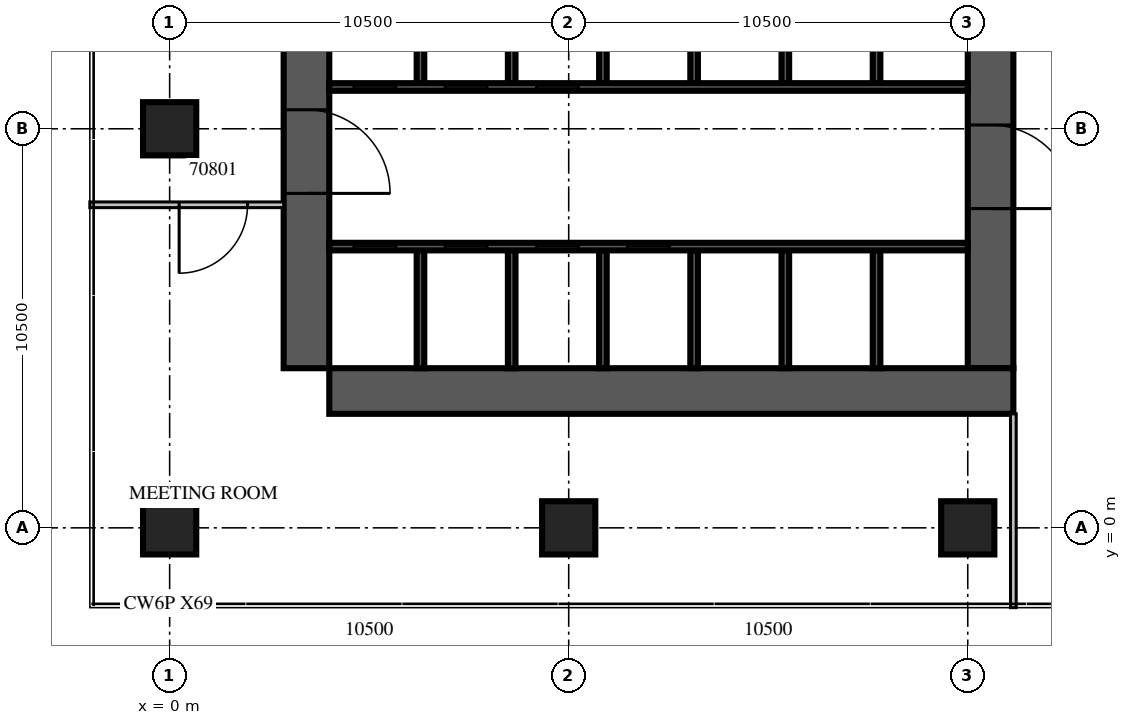
"""IFC4 building model, lengths in metres.
Left out: names, types, materials, properties, quantities, classifications, styles, units other than length and angle.
Written with IfcOpenShell. Run it as: python <this file> out.ifc"""

import sys

from ifc_helpers import new_model, si_unit, direction, frame, frame_2d, origin, origin_2d, place, context, subcontext, project, spatial, rectangle, extrude, source, transform, mapped, element, fill, save


model = new_model("IFC4")
c1 = context("Model", 3, precision=1e-05, world=origin(), true_north=direction((0.0, 1.0)))
c2 = subcontext(c1, "Body", "Model", "MODEL_VIEW")
j1 = project(units=[si_unit("LENGTHUNIT", "METRE"), si_unit("PLANEANGLEUNIT", "RADIAN")], contexts=[c1])
p1 = place(None, origin())
s1 = spatial("IfcSite", under=j1, at=p1, CompositionType="ELEMENT")
p2 = place(p1, origin())
s2 = spatial("IfcBuilding", under=s1, at=p2, CompositionType="ELEMENT")
p3 = place(p2, frame((0.0, 0.0, 29.1)))
s3 = spatial("IfcBuildingStorey", under=s2, at=p3, CompositionType="ELEMENT", Elevation=29.1)
m1 = source(origin(), c2, "Body", "SweptSolid", [
    extrude(rectangle(XDim=1.4, YDim=1.4, at=origin_2d()), origin(), (0.0, 0.0, 1.0), 5.4),
])
for number, where, z_axis, x_axis in (
    (1, (0.0, 0.0, 0.0), (0.0, 0.0, 1.0), (1.0, 0.0, 0.0)),
    (2, (0.0, 10.5, 0.0), (0.0, 0.0, 1.0), (1.0, 0.0, 0.0)),
    (3, (10.5, 0.0, 0.0), (0.0, 0.0, 1.0), (1.0, 0.0, 0.0)),
    (4, (21.0, 0.0, 0.0), (0.0, 0.0, 1.0), (1.0, 0.0, 0.0)),
):
    element("IfcColumn", number, at=place(p3, frame(where, z_axis=z_axis, x_axis=x_axis)), inside=s3, PredefinedType="COLUMN", context=c2, shape_type="MappedRepresentation", body=[
        mapped(m1, transform((0.0, 0.0, 0.0), scale=1.0)),
    ])
m2 = source(origin(), c2, "Body", "SweptSolid", [
    extrude(rectangle(XDim=18.0, YDim=1.2, at=frame_2d((9.0, 0.0))), origin(), (0.0, 0.0, 1.0), 5.4),
])
p4 = place(p3, frame((3.6, 4.2, 0.0), z_axis=(0.0, 0.0, 1.0), x_axis=(0.0, 1.0, 0.0)))
e5 = element("IfcWall", 5, at=p4, inside=s3, PredefinedType="SHEAR", context=c2, shape_type="MappedRepresentation", body=[
    mapped(m2, transform((0.0, 0.0, 0.0), scale=1.0)),
])
m3 = source(origin(), c2, "Body", "SweptSolid", [
    extrude(rectangle(XDim=2.2, YDim=2.1, at=frame_2d((1.1, 1.05))), frame((0.0, 0.61, 0.0), z_axis=(0.0, -1.0, 0.0), x_axis=(1.0, 0.0, 0.0)), (0.0, 0.0, 1.0), 1.22),
])
p5 = place(p4, frame((4.6, 0.0, 0.0)))
e6 = element("IfcOpeningElement", 6, at=p5, cuts=e5, PredefinedType="OPENING", context=c2, shape_type="MappedRepresentation", body=[
    mapped(m3, transform((0.0, 0.0, 0.0), scale=1.0)),
])
m4 = source(origin(), c2, "Body", "SweptSolid", [
    extrude(rectangle(XDim=16.8, YDim=1.2, at=frame_2d((8.4, 0.0))), origin(), (0.0, 0.0, 1.0), 5.4),
])
p6 = place(p3, frame((21.6, 4.2, 0.0), z_axis=(0.0, 0.0, 1.0), x_axis=(0.0, 1.0, 0.0)))
e7 = element("IfcWall", 7, at=p6, inside=s3, PredefinedType="SHEAR", context=c2, shape_type="MappedRepresentation", body=[
    mapped(m4, transform((0.0, 0.0, 0.0), scale=1.0)),
])
p7 = place(p6, frame((4.2, 0.0, 0.0)))
e8 = element("IfcOpeningElement", 8, at=p7, cuts=e7, PredefinedType="OPENING", context=c2, shape_type="MappedRepresentation", body=[
    mapped(m3, transform((0.0, 0.0, 0.0), scale=1.0)),
])
m5 = source(origin(), c2, "Body", "SweptSolid", [
    extrude(rectangle(XDim=1.2, YDim=2.1, at=frame_2d((0.6, 1.05))), frame((0.0, 0.61, 0.0), z_axis=(0.0, -1.0, 0.0), x_axis=(1.0, 0.0, 0.0)), (0.0, 0.0, 1.0), 1.22),
])
p8 = place(p6, frame((14.7, 0.0, 0.0)))
e9 = element("IfcOpeningElement", 9, at=p8, cuts=e7, PredefinedType="OPENING", context=c2, shape_type="MappedRepresentation", body=[
    mapped(m5, transform((0.0, 0.0, 0.0), scale=1.0)),
])
p9 = place(p3, frame((4.2, 3.6, 0.0), z_axis=(0.0, 0.0, 1.0), x_axis=(1.0, 0.0, 0.0)))
e10 = element("IfcWall", 10, at=p9, inside=s3, PredefinedType="SHEAR", context=c2, shape_type="MappedRepresentation", body=[
    mapped(m2, transform((0.0, 0.0, 0.0), scale=1.0)),
])
m6 = source(origin(), c2, "Body", "SweptSolid", [
    extrude(rectangle(XDim=3.1, YDim=0.2, at=frame_2d((1.55, 0.0))), origin(), (0.0, 0.0, 1.0), 5.4),
])
for number, where, z_axis, x_axis in (
    (11, (6.6, 4.2, 0.0), (0.0, 0.0, 1.0), (0.0, 1.0, 0.0)),
    (12, (9.0, 4.2, 0.0), (0.0, 0.0, 1.0), (0.0, 1.0, 0.0)),
    (13, (11.4, 4.2, 0.0), (0.0, 0.0, 1.0), (0.0, 1.0, 0.0)),
    (14, (13.8, 4.2, 0.0), (0.0, 0.0, 1.0), (0.0, 1.0, 0.0)),
    (15, (16.2, 4.2, 0.0), (0.0, 0.0, 1.0), (0.0, 1.0, 0.0)),
    (16, (18.6, 4.2, 0.0), (0.0, 0.0, 1.0), (0.0, 1.0, 0.0)),
):
    element("IfcWall", number, at=place(p3, frame(where, z_axis=z_axis, x_axis=x_axis)), inside=s3, PredefinedType="SOLIDWALL", context=c2, shape_type="MappedRepresentation", body=[
        mapped(m6, transform((0.0, 0.0, 0.0), scale=1.0)),
    ])
m7 = source(origin(), c2, "Body", "SweptSolid", [
    extrude(rectangle(XDim=3.0, YDim=0.2, at=frame_2d((1.5, 0.0))), origin(), (0.0, 0.0, 1.0), 5.4),
])
for number, where, z_axis, x_axis in (
    (17, (6.6, 11.7, 0.0), (0.0, 0.0, 1.0), (0.0, 1.0, 0.0)),
    (18, (9.0, 11.7, 0.0), (0.0, 0.0, 1.0), (0.0, 1.0, 0.0)),
    (19, (11.4, 11.7, 0.0), (0.0, 0.0, 1.0), (0.0, 1.0, 0.0)),
    (20, (13.8, 11.7, 0.0), (0.0, 0.0, 1.0), (0.0, 1.0, 0.0)),
    (21, (16.2, 11.7, 0.0), (0.0, 0.0, 1.0), (0.0, 1.0, 0.0)),
    (22, (18.6, 11.7, 0.0), (0.0, 0.0, 1.0), (0.0, 1.0, 0.0)),
):
    element("IfcWall", number, at=place(p3, frame(where, z_axis=z_axis, x_axis=x_axis)), inside=s3, PredefinedType="SOLIDWALL", context=c2, shape_type="MappedRepresentation", body=[
        mapped(m7, transform((0.0, 0.0, 0.0), scale=1.0)),
    ])
m8 = source(origin(), c2, "Body", "SweptSolid", [
    extrude(rectangle(XDim=16.8, YDim=0.2, at=frame_2d((8.4, 0.0))), origin(), (0.0, 0.0, 1.0), 5.4),
])
p10 = place(p3, frame((4.2, 7.4, 0.0), z_axis=(0.0, 0.0, 1.0), x_axis=(1.0, 0.0, 0.0)))
e23 = element("IfcWall", 23, at=p10, inside=s3, PredefinedType="SOLIDWALL", context=c2, shape_type="MappedRepresentation", body=[
    mapped(m8, transform((0.0, 0.0, 0.0), scale=1.0)),
])
m9 = source(origin(), c2, "Body", "SweptSolid", [
    extrude(rectangle(XDim=1.1, YDim=2.1, at=frame_2d((0.55, 1.05))), frame((0.0, 0.11, 0.0), z_axis=(0.0, -1.0, 0.0), x_axis=(1.0, 0.0, 0.0)), (0.0, 0.0, 1.0), 0.22),
])
p11 = place(p10, frame((0.65, 0.0, 0.0)))
e24 = element("IfcOpeningElement", 24, at=p11, cuts=e23, PredefinedType="OPENING", context=c2, shape_type="MappedRepresentation", body=[
    mapped(m9, transform((0.0, 0.0, 0.0), scale=1.0)),
])
p12 = place(p10, frame((3.05, 0.0, 0.0)))
e25 = element("IfcOpeningElement", 25, at=p12, cuts=e23, PredefinedType="OPENING", context=c2, shape_type="MappedRepresentation", body=[
    mapped(m9, transform((0.0, 0.0, 0.0), scale=1.0)),
])
p13 = place(p10, frame((5.45, 0.0, 0.0)))
e26 = element("IfcOpeningElement", 26, at=p13, cuts=e23, PredefinedType="OPENING", context=c2, shape_type="MappedRepresentation", body=[
    mapped(m9, transform((0.0, 0.0, 0.0), scale=1.0)),
])
p14 = place(p10, frame((7.85, 0.0, 0.0)))
e27 = element("IfcOpeningElement", 27, at=p14, cuts=e23, PredefinedType="OPENING", context=c2, shape_type="MappedRepresentation", body=[
    mapped(m9, transform((0.0, 0.0, 0.0), scale=1.0)),
])
p15 = place(p3, frame((4.2, 11.6, 0.0), z_axis=(0.0, 0.0, 1.0), x_axis=(1.0, 0.0, 0.0)))
e28 = element("IfcWall", 28, at=p15, inside=s3, PredefinedType="SOLIDWALL", context=c2, shape_type="MappedRepresentation", body=[
    mapped(m8, transform((0.0, 0.0, 0.0), scale=1.0)),
])
p16 = place(p15, frame((0.65, 0.0, 0.0)))
e29 = element("IfcOpeningElement", 29, at=p16, cuts=e28, PredefinedType="OPENING", context=c2, shape_type="MappedRepresentation", body=[
    mapped(m9, transform((0.0, 0.0, 0.0), scale=1.0)),
])
p17 = place(p15, frame((3.05, 0.0, 0.0)))
e30 = element("IfcOpeningElement", 30, at=p17, cuts=e28, PredefinedType="OPENING", context=c2, shape_type="MappedRepresentation", body=[
    mapped(m9, transform((0.0, 0.0, 0.0), scale=1.0)),
])
p18 = place(p15, frame((5.45, 0.0, 0.0)))
e31 = element("IfcOpeningElement", 31, at=p18, cuts=e28, PredefinedType="OPENING", context=c2, shape_type="MappedRepresentation", body=[
    mapped(m9, transform((0.0, 0.0, 0.0), scale=1.0)),
])
m10 = source(origin(), c2, "Body", "SweptSolid", [
    extrude(rectangle(XDim=5.1, YDim=0.15, at=frame_2d((2.55, 0.0))), origin(), (0.0, 0.0, 1.0), 4.8),
])
p19 = place(p3, frame((-2.1, 8.5, 0.0), z_axis=(0.0, 0.0, 1.0), x_axis=(1.0, 0.0, 0.0)))
e32 = element("IfcWall", 32, at=p19, inside=s3, PredefinedType="PARTITIONING", context=c2, shape_type="MappedRepresentation", body=[
    mapped(m10, transform((0.0, 0.0, 0.0), scale=1.0)),
])
m11 = source(origin(), c2, "Body", "SweptSolid", [
    extrude(rectangle(XDim=1.8, YDim=2.1, at=frame_2d((0.9, 1.05))), frame((0.0, 0.085, 0.0), z_axis=(0.0, -1.0, 0.0), x_axis=(1.0, 0.0, 0.0)), (0.0, 0.0, 1.0), 0.17),
])
p20 = place(p19, frame((2.35, 0.0, 0.0)))
e33 = element("IfcOpeningElement", 33, at=p20, cuts=e32, PredefinedType="OPENING", context=c2, shape_type="MappedRepresentation", body=[
    mapped(m11, transform((0.0, 0.0, 0.0), scale=1.0)),
])
p21 = place(p3, frame((22.2, -2.1, 0.0), z_axis=(0.0, 0.0, 1.0), x_axis=(0.0, 1.0, 0.0)))
e34 = element("IfcWall", 34, at=p21, inside=s3, PredefinedType="PARTITIONING", context=c2, shape_type="MappedRepresentation", body=[
    mapped(m10, transform((0.0, 0.0, 0.0), scale=1.0)),
])
m12 = source(origin(), c2, "Body", "SweptSolid", [
    extrude(rectangle(XDim=1.1, YDim=2.1, at=frame_2d((0.55, 1.05))), frame((0.0, 0.025, 0.0), z_axis=(0.0, -1.0, 0.0), x_axis=(1.0, 0.0, 0.0)), (0.0, 0.0, 1.0), 0.05),
])
p22 = place(p11, origin())
e35 = element("IfcDoor", 35, at=p22, inside=s3, OperationType="SLIDING_TO_LEFT", PredefinedType="DOOR", context=c2, shape_type="MappedRepresentation", body=[
    mapped(m12, transform((0.0, 0.0, 0.0), scale=1.0)),
])
fill(e24, e35)
p23 = place(p12, origin())
e36 = element("IfcDoor", 36, at=p23, inside=s3, OperationType="SLIDING_TO_LEFT", PredefinedType="DOOR", context=c2, shape_type="MappedRepresentation", body=[
    mapped(m12, transform((0.0, 0.0, 0.0), scale=1.0)),
])
fill(e25, e36)
p24 = place(p13, origin())
e37 = element("IfcDoor", 37, at=p24, inside=s3, OperationType="SLIDING_TO_LEFT", PredefinedType="DOOR", context=c2, shape_type="MappedRepresentation", body=[
    mapped(m12, transform((0.0, 0.0, 0.0), scale=1.0)),
])
fill(e26, e37)
p25 = place(p14, origin())
e38 = element("IfcDoor", 38, at=p25, inside=s3, OperationType="SLIDING_TO_LEFT", PredefinedType="DOOR", context=c2, shape_type="MappedRepresentation", body=[
    mapped(m12, transform((0.0, 0.0, 0.0), scale=1.0)),
])
fill(e27, e38)
p26 = place(p16, origin())
e39 = element("IfcDoor", 39, at=p26, inside=s3, OperationType="SLIDING_TO_LEFT", PredefinedType="DOOR", context=c2, shape_type="MappedRepresentation", body=[
    mapped(m12, transform((0.0, 0.0, 0.0), scale=1.0)),
])
fill(e29, e39)
p27 = place(p17, origin())
e40 = element("IfcDoor", 40, at=p27, inside=s3, OperationType="SLIDING_TO_LEFT", PredefinedType="DOOR", context=c2, shape_type="MappedRepresentation", body=[
    mapped(m12, transform((0.0, 0.0, 0.0), scale=1.0)),
])
fill(e30, e40)
p28 = place(p18, origin())
e41 = element("IfcDoor", 41, at=p28, inside=s3, OperationType="SLIDING_TO_LEFT", PredefinedType="DOOR", context=c2, shape_type="MappedRepresentation", body=[
    mapped(m12, transform((0.0, 0.0, 0.0), scale=1.0)),
])
fill(e31, e41)
m13 = source(origin(), c2, "Body", "SweptSolid", [
    extrude(rectangle(XDim=2.2, YDim=2.1, at=frame_2d((1.1, 1.05))), frame((0.0, 0.025, 0.0), z_axis=(0.0, -1.0, 0.0), x_axis=(1.0, 0.0, 0.0)), (0.0, 0.0, 1.0), 0.05),
])
p29 = place(p7, origin())
e42 = element("IfcDoor", 42, at=p29, inside=s3, OperationType="DOUBLE_DOOR_SINGLE_SWING", PredefinedType="DOOR", context=c2, shape_type="MappedRepresentation", body=[
    mapped(m13, transform((0.0, 0.0, 0.0), scale=1.0)),
])
fill(e8, e42)
p30 = place(p5, origin())
e43 = element("IfcDoor", 43, at=p30, inside=s3, OperationType="DOUBLE_DOOR_SINGLE_SWING", PredefinedType="DOOR", context=c2, shape_type="MappedRepresentation", body=[
    mapped(m13, transform((0.0, 0.0, 0.0), scale=1.0)),
])
fill(e6, e43)
m14 = source(origin(), c2, "Body", "SweptSolid", [
    extrude(rectangle(XDim=1.8, YDim=2.1, at=frame_2d((0.9, 1.05))), frame((0.0, 0.025, 0.0), z_axis=(0.0, -1.0, 0.0), x_axis=(1.0, 0.0, 0.0)), (0.0, 0.0, 1.0), 0.05),
])
p31 = place(p20, origin())
e44 = element("IfcDoor", 44, at=p31, inside=s3, OperationType="DOUBLE_DOOR_SINGLE_SWING", PredefinedType="DOOR", context=c2, shape_type="MappedRepresentation", body=[
    mapped(m14, transform((0.0, 0.0, 0.0), scale=1.0)),
])
fill(e33, e44)
save(model, sys.argv[1])
